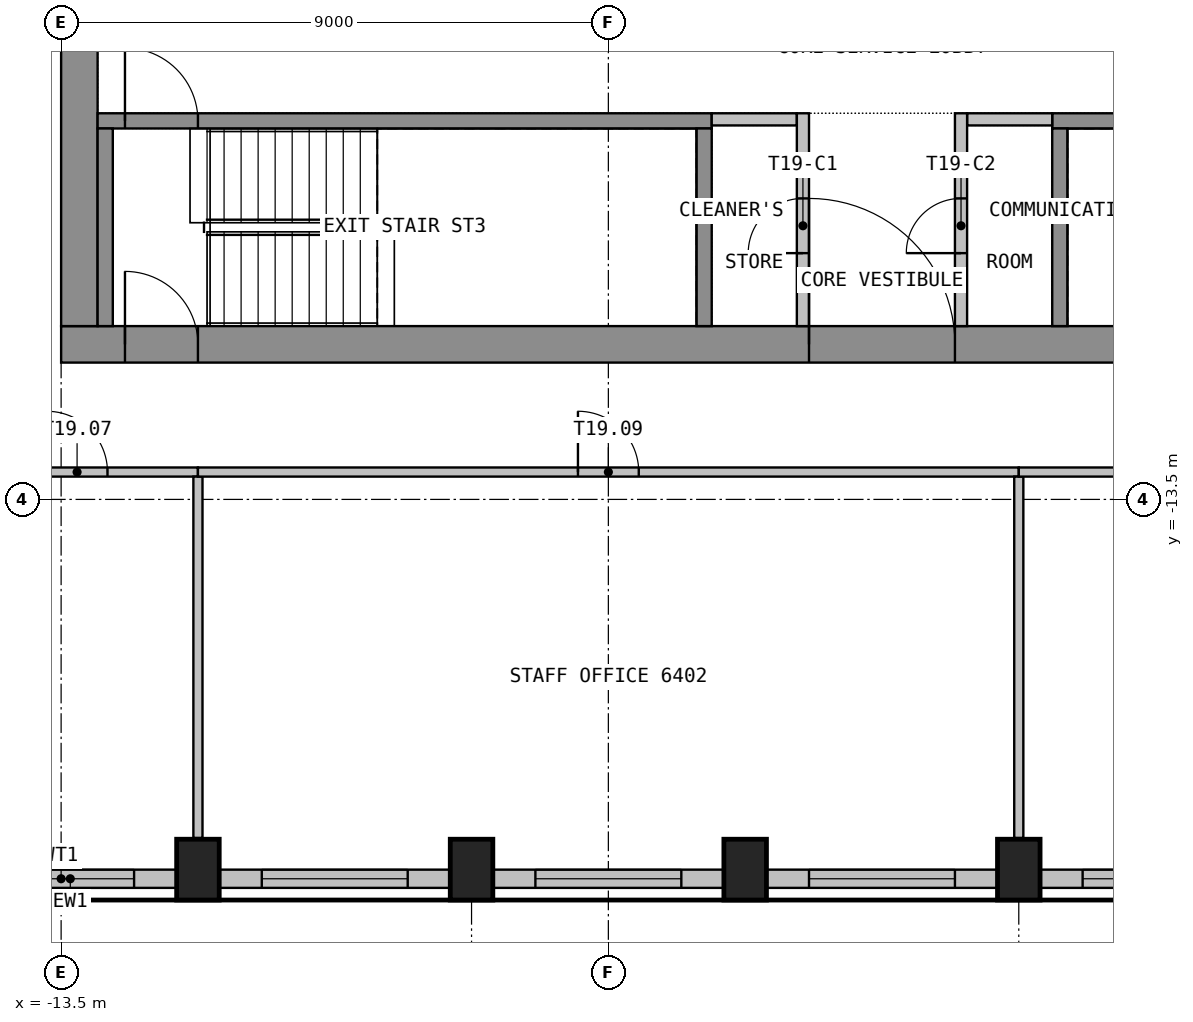
"""IFC4 building model, lengths in metres.
Left out: names, types, materials, properties, quantities, classifications, styles, units other than length and angle.
Written with IfcOpenShell. Run it as: python <this file> out.ifc"""

import sys

from ifc_helpers import new_model, si_unit, direction, frame, frame_2d, origin, origin_2d, place, context, subcontext, project, spatial, rectangle, extrude, element, fill, save


model = new_model("IFC4")
c1 = context("Model", 3, precision=1e-05, world=origin(), true_north=direction((0.0, 1.0)))
c2 = subcontext(c1, "Body", "Model", "MODEL_VIEW")
j1 = project(units=[si_unit("LENGTHUNIT", "METRE"), si_unit("PLANEANGLEUNIT", "RADIAN")], contexts=[c1])
p1 = place(None, origin())
s1 = spatial("IfcSite", under=j1, at=p1, CompositionType="ELEMENT")
p2 = place(p1, origin())
s2 = spatial("IfcBuilding", under=s1, at=p2, CompositionType="ELEMENT")
p3 = place(p2, frame((0.0, 0.0, 258.6)))
s3 = spatial("IfcBuildingStorey", under=s2, at=p3, CompositionType="ELEMENT", Elevation=258.6)
for number, where, z_axis, x_axis in (
    (1, (-11.25, -19.588, 0.0), (0.0, 0.0, 1.0), (1.0, 0.0, 0.0)),
    (2, (-6.75, -19.588, 0.0), (0.0, 0.0, 1.0), (1.0, 0.0, 0.0)),
    (3, (-2.25, -19.588, 0.0), (0.0, 0.0, 1.0), (1.0, 0.0, 0.0)),
    (4, (2.25, -19.588, 0.0), (0.0, 0.0, 1.0), (1.0, 0.0, 0.0)),
):
    element("IfcColumn", number, at=place(p3, frame(where, z_axis=z_axis, x_axis=x_axis)), inside=s3, PredefinedType="COLUMN", context=c2, shape_type="SweptSolid", body=[
        extrude(rectangle(XDim=0.7, YDim=1.0, at=origin_2d()), origin(), (0.0, 0.0, 1.0), 3.575),
    ])
p4 = place(p3, frame((-15.098, -19.739, 0.0), z_axis=(0.0, 0.0, 1.0), x_axis=(1.0, 0.0, 0.0)))
e5 = element("IfcWall", 5, at=p4, inside=s3, PredefinedType="SOLIDWALL", context=c2, shape_type="SweptSolid", body=[
    extrude(rectangle(XDim=3.498, YDim=0.3, at=frame_2d((1.749, 0.0))), origin(), (0.0, 0.0, 1.0), 3.575),
])
p5 = place(p4, frame((0.398, 0.0, 0.9)))
e6 = element("IfcOpeningElement", 6, at=p5, cuts=e5, PredefinedType="OPENING", context=c2, shape_type="SweptSolid", body=[
    extrude(rectangle(XDim=2.4, YDim=2.1, at=frame_2d((1.2, 1.05))), frame((0.0, 0.16, 0.0), z_axis=(0.0, -1.0, 0.0), x_axis=(1.0, 0.0, 0.0)), (0.0, 0.0, 1.0), 0.32),
])
p6 = place(p3, frame((-10.899, -19.739, 0.0), z_axis=(0.0, 0.0, 1.0), x_axis=(1.0, 0.0, 0.0)))
e7 = element("IfcWall", 7, at=p6, inside=s3, PredefinedType="SOLIDWALL", context=c2, shape_type="SweptSolid", body=[
    extrude(rectangle(XDim=3.799, YDim=0.3, at=frame_2d((1.899, 0.0))), origin(), (0.0, 0.0, 1.0), 3.575),
])
p7 = place(p6, frame((0.699, 0.0, 0.9)))
e8 = element("IfcOpeningElement", 8, at=p7, cuts=e7, PredefinedType="OPENING", context=c2, shape_type="SweptSolid", body=[
    extrude(rectangle(XDim=2.4, YDim=2.1, at=frame_2d((1.2, 1.05))), frame((0.0, 0.16, 0.0), z_axis=(0.0, -1.0, 0.0), x_axis=(1.0, 0.0, 0.0)), (0.0, 0.0, 1.0), 0.32),
])
p8 = place(p3, frame((-6.399, -19.739, 0.0), z_axis=(0.0, 0.0, 1.0), x_axis=(1.0, 0.0, 0.0)))
e9 = element("IfcWall", 9, at=p8, inside=s3, PredefinedType="SOLIDWALL", context=c2, shape_type="SweptSolid", body=[
    extrude(rectangle(XDim=3.799, YDim=0.3, at=frame_2d((1.899, 0.0))), origin(), (0.0, 0.0, 1.0), 3.575),
])
p9 = place(p8, frame((0.699, 0.0, 0.9)))
e10 = element("IfcOpeningElement", 10, at=p9, cuts=e9, PredefinedType="OPENING", context=c2, shape_type="SweptSolid", body=[
    extrude(rectangle(XDim=2.4, YDim=2.1, at=frame_2d((1.2, 1.05))), frame((0.0, 0.16, 0.0), z_axis=(0.0, -1.0, 0.0), x_axis=(1.0, 0.0, 0.0)), (0.0, 0.0, 1.0), 0.32),
])
p10 = place(p3, frame((-1.899, -19.739, 0.0), z_axis=(0.0, 0.0, 1.0), x_axis=(1.0, 0.0, 0.0)))
e11 = element("IfcWall", 11, at=p10, inside=s3, PredefinedType="SOLIDWALL", context=c2, shape_type="SweptSolid", body=[
    extrude(rectangle(XDim=3.799, YDim=0.3, at=frame_2d((1.899, 0.0))), origin(), (0.0, 0.0, 1.0), 3.575),
])
p11 = place(p10, frame((0.699, 0.0, 0.9)))
e12 = element("IfcOpeningElement", 12, at=p11, cuts=e11, PredefinedType="OPENING", context=c2, shape_type="SweptSolid", body=[
    extrude(rectangle(XDim=2.4, YDim=2.1, at=frame_2d((1.2, 1.05))), frame((0.0, 0.16, 0.0), z_axis=(0.0, -1.0, 0.0), x_axis=(1.0, 0.0, 0.0)), (0.0, 0.0, 1.0), 0.32),
])
p12 = place(p3, frame((2.601, -19.739, 0.0), z_axis=(0.0, 0.0, 1.0), x_axis=(1.0, 0.0, 0.0)))
e13 = element("IfcWall", 13, at=p12, inside=s3, PredefinedType="SOLIDWALL", context=c2, shape_type="SweptSolid", body=[
    extrude(rectangle(XDim=3.799, YDim=0.3, at=frame_2d((1.899, 0.0))), origin(), (0.0, 0.0, 1.0), 3.575),
])
p13 = place(p12, frame((0.699, 0.0, 0.9)))
e14 = element("IfcOpeningElement", 14, at=p13, cuts=e13, PredefinedType="OPENING", context=c2, shape_type="SweptSolid", body=[
    extrude(rectangle(XDim=2.4, YDim=2.1, at=frame_2d((1.2, 1.05))), frame((0.0, 0.16, 0.0), z_axis=(0.0, -1.0, 0.0), x_axis=(1.0, 0.0, 0.0)), (0.0, 0.0, 1.0), 0.32),
])
p14 = place(p3, frame((-13.5, -10.95, 0.0), z_axis=(0.0, 0.0, 1.0), x_axis=(1.0, 0.0, 0.0)))
e15 = element("IfcWall", 15, at=p14, inside=s3, PredefinedType="SHEAR", context=c2, shape_type="SweptSolid", body=[
    extrude(rectangle(XDim=27.0, YDim=0.6, at=frame_2d((13.5, 0.0))), origin(), (0.0, 0.0, 1.0), 3.575),
])
p15 = place(p14, frame((12.3, 0.0, 0.0)))
e16 = element("IfcOpeningElement", 16, at=p15, cuts=e15, PredefinedType="OPENING", context=c2, shape_type="SweptSolid", body=[
    extrude(rectangle(XDim=2.4, YDim=2.1, at=frame_2d((1.2, 1.05))), frame((0.0, 0.31, 0.0), z_axis=(0.0, -1.0, 0.0), x_axis=(1.0, 0.0, 0.0)), (0.0, 0.0, 1.0), 0.62),
])
p16 = place(p14, frame((1.05, 0.0, 0.0)))
e17 = element("IfcOpeningElement", 17, at=p16, cuts=e15, PredefinedType="OPENING", context=c2, shape_type="SweptSolid", body=[
    extrude(rectangle(XDim=1.2, YDim=2.1, at=frame_2d((0.6, 1.05))), frame((0.0, 0.31, 0.0), z_axis=(0.0, -1.0, 0.0), x_axis=(1.0, 0.0, 0.0)), (0.0, 0.0, 1.0), 0.62),
])
p17 = place(p14, frame((24.75, 0.0, 0.0)))
e18 = element("IfcOpeningElement", 18, at=p17, cuts=e15, PredefinedType="OPENING", context=c2, shape_type="SweptSolid", body=[
    extrude(rectangle(XDim=1.2, YDim=2.1, at=frame_2d((0.6, 1.05))), frame((0.0, 0.31, 0.0), z_axis=(0.0, -1.0, 0.0), x_axis=(1.0, 0.0, 0.0)), (0.0, 0.0, 1.0), 0.62),
])
p18 = place(p3, frame((-13.2, -10.65, 0.0), z_axis=(0.0, 0.0, 1.0), x_axis=(0.0, 1.0, 0.0)))
e19 = element("IfcWall", 19, at=p18, inside=s3, PredefinedType="SHEAR", context=c2, shape_type="SweptSolid", body=[
    extrude(rectangle(XDim=21.3, YDim=0.6, at=frame_2d((10.65, 0.0))), origin(), (0.0, 0.0, 1.0), 3.575),
])
p19 = place(p18, frame((9.45, 0.0, 0.0)))
e20 = element("IfcOpeningElement", 20, at=p19, cuts=e19, PredefinedType="OPENING", context=c2, shape_type="SweptSolid", body=[
    extrude(rectangle(XDim=2.4, YDim=2.1, at=frame_2d((1.2, 1.05))), frame((0.0, 0.31, 0.0), z_axis=(0.0, -1.0, 0.0), x_axis=(1.0, 0.0, 0.0)), (0.0, 0.0, 1.0), 0.62),
])
p20 = place(p3, frame((-12.9, -7.275, 0.0), z_axis=(0.0, 0.0, 1.0), x_axis=(1.0, 0.0, 0.0)))
e21 = element("IfcWall", 21, at=p20, inside=s3, PredefinedType="SHEAR", context=c2, shape_type="SweptSolid", body=[
    extrude(rectangle(XDim=10.1, YDim=0.25, at=frame_2d((5.05, 0.0))), origin(), (0.0, 0.0, 1.0), 3.575),
])
p21 = place(p20, frame((0.45, 0.0, 0.0)))
e22 = element("IfcOpeningElement", 22, at=p21, cuts=e21, PredefinedType="OPENING", context=c2, shape_type="SweptSolid", body=[
    extrude(rectangle(XDim=1.2, YDim=2.1, at=frame_2d((0.6, 1.05))), frame((0.0, 0.135, 0.0), z_axis=(0.0, -1.0, 0.0), x_axis=(1.0, 0.0, 0.0)), (0.0, 0.0, 1.0), 0.27),
])
for number, where, z_axis, x_axis in (
    (23, (-12.775, -10.65, 0.0), (0.0, 0.0, 1.0), (0.0, 1.0, 0.0)),
    (24, (-2.925, -10.65, 0.0), (0.0, 0.0, 1.0), (0.0, 1.0, 0.0)),
):
    element("IfcWall", number, at=place(p3, frame(where, z_axis=z_axis, x_axis=x_axis)), inside=s3, PredefinedType="SHEAR", context=c2, shape_type="SweptSolid", body=[
        extrude(rectangle(XDim=3.25, YDim=0.25, at=frame_2d((1.625, 0.0))), origin(), (0.0, 0.0, 1.0), 3.575),
    ])
p22 = place(p3, frame((2.8, -7.275, 0.0), z_axis=(0.0, 0.0, 1.0), x_axis=(1.0, 0.0, 0.0)))
e25 = element("IfcWall", 25, at=p22, inside=s3, PredefinedType="SHEAR", context=c2, shape_type="SweptSolid", body=[
    extrude(rectangle(XDim=10.1, YDim=0.25, at=frame_2d((5.05, 0.0))), origin(), (0.0, 0.0, 1.0), 3.575),
])
p23 = place(p22, frame((8.45, 0.0, 0.0)))
e26 = element("IfcOpeningElement", 26, at=p23, cuts=e25, PredefinedType="OPENING", context=c2, shape_type="SweptSolid", body=[
    extrude(rectangle(XDim=1.2, YDim=2.1, at=frame_2d((0.6, 1.05))), frame((0.0, 0.135, 0.0), z_axis=(0.0, -1.0, 0.0), x_axis=(1.0, 0.0, 0.0)), (0.0, 0.0, 1.0), 0.27),
])
p24 = place(p3, frame((2.925, -10.65, 0.0), z_axis=(0.0, 0.0, 1.0), x_axis=(0.0, 1.0, 0.0)))
e27 = element("IfcWall", 27, at=p24, inside=s3, PredefinedType="SHEAR", context=c2, shape_type="SweptSolid", body=[
    extrude(rectangle(XDim=3.25, YDim=0.25, at=frame_2d((1.625, 0.0))), origin(), (0.0, 0.0, 1.0), 3.575),
])
for number, where, z_axis, x_axis in (
    (28, (-2.8, -7.25, 0.0), (0.0, 0.0, 1.0), (1.0, 0.0, 0.0)),
    (29, (1.4, -7.25, 0.0), (0.0, 0.0, 1.0), (1.0, 0.0, 0.0)),
):
    element("IfcWall", number, at=place(p3, frame(where, z_axis=z_axis, x_axis=x_axis)), inside=s3, PredefinedType="PARTITIONING", context=c2, shape_type="SweptSolid", body=[
        extrude(rectangle(XDim=1.4, YDim=0.2, at=frame_2d((0.7, 0.0))), origin(), (0.0, 0.0, 1.0), 3.575),
    ])
p25 = place(p3, frame((-1.3, -10.65, 0.0), z_axis=(0.0, 0.0, 1.0), x_axis=(0.0, 1.0, 0.0)))
e30 = element("IfcWall", 30, at=p25, inside=s3, PredefinedType="PARTITIONING", context=c2, shape_type="SweptSolid", body=[
    extrude(rectangle(XDim=3.5, YDim=0.2, at=frame_2d((1.75, 0.0))), origin(), (0.0, 0.0, 1.0), 3.575),
])
p26 = place(p25, frame((1.2, 0.0, 0.0)))
e31 = element("IfcOpeningElement", 31, at=p26, cuts=e30, PredefinedType="OPENING", context=c2, shape_type="SweptSolid", body=[
    extrude(rectangle(XDim=0.9, YDim=2.1, at=frame_2d((0.45, 1.05))), frame((0.0, 0.11, 0.0), z_axis=(0.0, -1.0, 0.0), x_axis=(1.0, 0.0, 0.0)), (0.0, 0.0, 1.0), 0.22),
])
p27 = place(p3, frame((1.3, -10.65, 0.0), z_axis=(0.0, 0.0, 1.0), x_axis=(0.0, 1.0, 0.0)))
e32 = element("IfcWall", 32, at=p27, inside=s3, PredefinedType="PARTITIONING", context=c2, shape_type="SweptSolid", body=[
    extrude(rectangle(XDim=3.5, YDim=0.2, at=frame_2d((1.75, 0.0))), origin(), (0.0, 0.0, 1.0), 3.575),
])
p28 = place(p27, frame((1.2, 0.0, 0.0)))
e33 = element("IfcOpeningElement", 33, at=p28, cuts=e32, PredefinedType="OPENING", context=c2, shape_type="SweptSolid", body=[
    extrude(rectangle(XDim=0.9, YDim=2.1, at=frame_2d((0.45, 1.05))), frame((0.0, 0.11, 0.0), z_axis=(0.0, -1.0, 0.0), x_axis=(1.0, 0.0, 0.0)), (0.0, 0.0, 1.0), 0.22),
])
p29 = place(p3, frame((-15.225, -13.05, 0.0), z_axis=(0.0, 0.0, 1.0), x_axis=(1.0, 0.0, 0.0)))
e34 = element("IfcWall", 34, at=p29, inside=s3, PredefinedType="PARTITIONING", context=c2, shape_type="SweptSolid", body=[
    extrude(rectangle(XDim=3.975, YDim=0.15, at=frame_2d((1.988, 0.0))), origin(), (0.0, 0.0, 1.0), 3.575),
])
p30 = place(p29, frame((1.488, 0.0, 0.0)))
e35 = element("IfcOpeningElement", 35, at=p30, cuts=e34, PredefinedType="OPENING", context=c2, shape_type="SweptSolid", body=[
    extrude(rectangle(XDim=1.0, YDim=2.1, at=frame_2d((0.5, 1.05))), frame((0.0, 0.085, 0.0), z_axis=(0.0, -1.0, 0.0), x_axis=(1.0, 0.0, 0.0)), (0.0, 0.0, 1.0), 0.17),
])
p31 = place(p3, frame((-11.25, -13.125, 0.0), z_axis=(0.0, 0.0, 1.0), x_axis=(0.0, -1.0, 0.0)))
e36 = element("IfcWall", 36, at=p31, inside=s3, PredefinedType="PARTITIONING", context=c2, shape_type="SweptSolid", body=[
    extrude(rectangle(XDim=5.944, YDim=0.15, at=frame_2d((2.972, 0.0))), origin(), (0.0, 0.0, 1.0), 3.575),
])
p32 = place(p3, frame((-11.25, -13.05, 0.0), z_axis=(0.0, 0.0, 1.0), x_axis=(1.0, 0.0, 0.0)))
e37 = element("IfcWall", 37, at=p32, inside=s3, PredefinedType="PARTITIONING", context=c2, shape_type="SweptSolid", body=[
    extrude(rectangle(XDim=13.5, YDim=0.15, at=frame_2d((6.75, 0.0))), origin(), (0.0, 0.0, 1.0), 3.575),
])
p33 = place(p32, frame((6.25, 0.0, 0.0)))
e38 = element("IfcOpeningElement", 38, at=p33, cuts=e37, PredefinedType="OPENING", context=c2, shape_type="SweptSolid", body=[
    extrude(rectangle(XDim=1.0, YDim=2.1, at=frame_2d((0.5, 1.05))), frame((0.0, 0.085, 0.0), z_axis=(0.0, -1.0, 0.0), x_axis=(1.0, 0.0, 0.0)), (0.0, 0.0, 1.0), 0.17),
])
p34 = place(p3, frame((2.25, -13.125, 0.0), z_axis=(0.0, 0.0, 1.0), x_axis=(0.0, -1.0, 0.0)))
e39 = element("IfcWall", 39, at=p34, inside=s3, PredefinedType="PARTITIONING", context=c2, shape_type="SweptSolid", body=[
    extrude(rectangle(XDim=5.944, YDim=0.15, at=frame_2d((2.972, 0.0))), origin(), (0.0, 0.0, 1.0), 3.575),
])
p35 = place(p3, frame((2.25, -13.05, 0.0), z_axis=(0.0, 0.0, 1.0), x_axis=(1.0, 0.0, 0.0)))
e40 = element("IfcWall", 40, at=p35, inside=s3, PredefinedType="PARTITIONING", context=c2, shape_type="SweptSolid", body=[
    extrude(rectangle(XDim=11.614, YDim=0.15, at=frame_2d((5.807, 0.0))), origin(), (0.0, 0.0, 1.0), 3.575),
])
p36 = place(p35, frame((5.307, 0.0, 0.0)))
e41 = element("IfcOpeningElement", 41, at=p36, cuts=e40, PredefinedType="OPENING", context=c2, shape_type="SweptSolid", body=[
    extrude(rectangle(XDim=1.0, YDim=2.1, at=frame_2d((0.5, 1.05))), frame((0.0, 0.085, 0.0), z_axis=(0.0, -1.0, 0.0), x_axis=(1.0, 0.0, 0.0)), (0.0, 0.0, 1.0), 0.17),
])
p37 = place(p5, origin())
e42 = element("IfcWindow", 42, at=p37, inside=s3, PartitioningType="SINGLE_PANEL", PredefinedType="WINDOW", context=c2, shape_type="SweptSolid", body=[
    extrude(rectangle(XDim=2.4, YDim=2.1, at=frame_2d((1.2, 1.05))), frame((0.0, 0.03, 0.0), z_axis=(0.0, -1.0, 0.0), x_axis=(1.0, 0.0, 0.0)), (0.0, 0.0, 1.0), 0.06),
])
fill(e6, e42)
p38 = place(p7, origin())
e43 = element("IfcWindow", 43, at=p38, inside=s3, PartitioningType="SINGLE_PANEL", PredefinedType="WINDOW", context=c2, shape_type="SweptSolid", body=[
    extrude(rectangle(XDim=2.4, YDim=2.1, at=frame_2d((1.2, 1.05))), frame((0.0, 0.03, 0.0), z_axis=(0.0, -1.0, 0.0), x_axis=(1.0, 0.0, 0.0)), (0.0, 0.0, 1.0), 0.06),
])
fill(e8, e43)
p39 = place(p9, origin())
e44 = element("IfcWindow", 44, at=p39, inside=s3, PartitioningType="SINGLE_PANEL", PredefinedType="WINDOW", context=c2, shape_type="SweptSolid", body=[
    extrude(rectangle(XDim=2.4, YDim=2.1, at=frame_2d((1.2, 1.05))), frame((0.0, 0.03, 0.0), z_axis=(0.0, -1.0, 0.0), x_axis=(1.0, 0.0, 0.0)), (0.0, 0.0, 1.0), 0.06),
])
fill(e10, e44)
p40 = place(p11, origin())
e45 = element("IfcWindow", 45, at=p40, inside=s3, PartitioningType="SINGLE_PANEL", PredefinedType="WINDOW", context=c2, shape_type="SweptSolid", body=[
    extrude(rectangle(XDim=2.4, YDim=2.1, at=frame_2d((1.2, 1.05))), frame((0.0, 0.03, 0.0), z_axis=(0.0, -1.0, 0.0), x_axis=(1.0, 0.0, 0.0)), (0.0, 0.0, 1.0), 0.06),
])
fill(e12, e45)
p41 = place(p13, origin())
e46 = element("IfcWindow", 46, at=p41, inside=s3, PartitioningType="SINGLE_PANEL", PredefinedType="WINDOW", context=c2, shape_type="SweptSolid", body=[
    extrude(rectangle(XDim=2.4, YDim=2.1, at=frame_2d((1.2, 1.05))), frame((0.0, 0.03, 0.0), z_axis=(0.0, -1.0, 0.0), x_axis=(1.0, 0.0, 0.0)), (0.0, 0.0, 1.0), 0.06),
])
fill(e14, e46)
p42 = place(p15, origin())
e47 = element("IfcDoor", 47, at=p42, inside=s3, OperationType="DOUBLE_DOOR_DOUBLE_SWING", PredefinedType="DOOR", context=c2, shape_type="SweptSolid", body=[
    extrude(rectangle(XDim=2.4, YDim=2.1, at=frame_2d((1.2, 1.05))), frame((0.0, 0.025, 0.0), z_axis=(0.0, -1.0, 0.0), x_axis=(1.0, 0.0, 0.0)), (0.0, 0.0, 1.0), 0.05),
])
fill(e16, e47)
p43 = place(p16, origin())
e48 = element("IfcDoor", 48, at=p43, inside=s3, OperationType="SINGLE_SWING_RIGHT", PredefinedType="DOOR", context=c2, shape_type="SweptSolid", body=[
    extrude(rectangle(XDim=1.2, YDim=2.1, at=frame_2d((0.6, 1.05))), frame((0.0, 0.025, 0.0), z_axis=(0.0, -1.0, 0.0), x_axis=(1.0, 0.0, 0.0)), (0.0, 0.0, 1.0), 0.05),
])
fill(e17, e48)
p44 = place(p21, origin())
e49 = element("IfcDoor", 49, at=p44, inside=s3, OperationType="SINGLE_SWING_LEFT", PredefinedType="DOOR", context=c2, shape_type="SweptSolid", body=[
    extrude(rectangle(XDim=1.2, YDim=2.1, at=frame_2d((0.6, 1.05))), frame((0.0, 0.025, 0.0), z_axis=(0.0, -1.0, 0.0), x_axis=(1.0, 0.0, 0.0)), (0.0, 0.0, 1.0), 0.05),
])
fill(e22, e49)
p45 = place(p26, origin())
e50 = element("IfcDoor", 50, at=p45, inside=s3, OperationType="SINGLE_SWING_LEFT", PredefinedType="DOOR", context=c2, shape_type="SweptSolid", body=[
    extrude(rectangle(XDim=0.9, YDim=2.1, at=frame_2d((0.45, 1.05))), frame((0.0, 0.025, 0.0), z_axis=(0.0, -1.0, 0.0), x_axis=(1.0, 0.0, 0.0)), (0.0, 0.0, 1.0), 0.05),
])
fill(e31, e50)
p46 = place(p28, origin())
e51 = element("IfcDoor", 51, at=p46, inside=s3, OperationType="SINGLE_SWING_LEFT", PredefinedType="DOOR", context=c2, shape_type="SweptSolid", body=[
    extrude(rectangle(XDim=0.9, YDim=2.1, at=frame_2d((0.45, 1.05))), frame((0.0, 0.025, 0.0), z_axis=(0.0, -1.0, 0.0), x_axis=(1.0, 0.0, 0.0)), (0.0, 0.0, 1.0), 0.05),
])
fill(e33, e51)
p47 = place(p30, origin())
e52 = element("IfcDoor", 52, at=p47, inside=s3, OperationType="SINGLE_SWING_RIGHT", PredefinedType="DOOR", context=c2, shape_type="SweptSolid", body=[
    extrude(rectangle(XDim=1.0, YDim=2.1, at=frame_2d((0.5, 1.05))), frame((0.0, 0.025, 0.0), z_axis=(0.0, -1.0, 0.0), x_axis=(1.0, 0.0, 0.0)), (0.0, 0.0, 1.0), 0.05),
])
fill(e35, e52)
p48 = place(p33, origin())
e53 = element("IfcDoor", 53, at=p48, inside=s3, OperationType="SINGLE_SWING_RIGHT", PredefinedType="DOOR", context=c2, shape_type="SweptSolid", body=[
    extrude(rectangle(XDim=1.0, YDim=2.1, at=frame_2d((0.5, 1.05))), frame((0.0, 0.025, 0.0), z_axis=(0.0, -1.0, 0.0), x_axis=(1.0, 0.0, 0.0)), (0.0, 0.0, 1.0), 0.05),
])
fill(e38, e53)
save(model, sys.argv[1])
